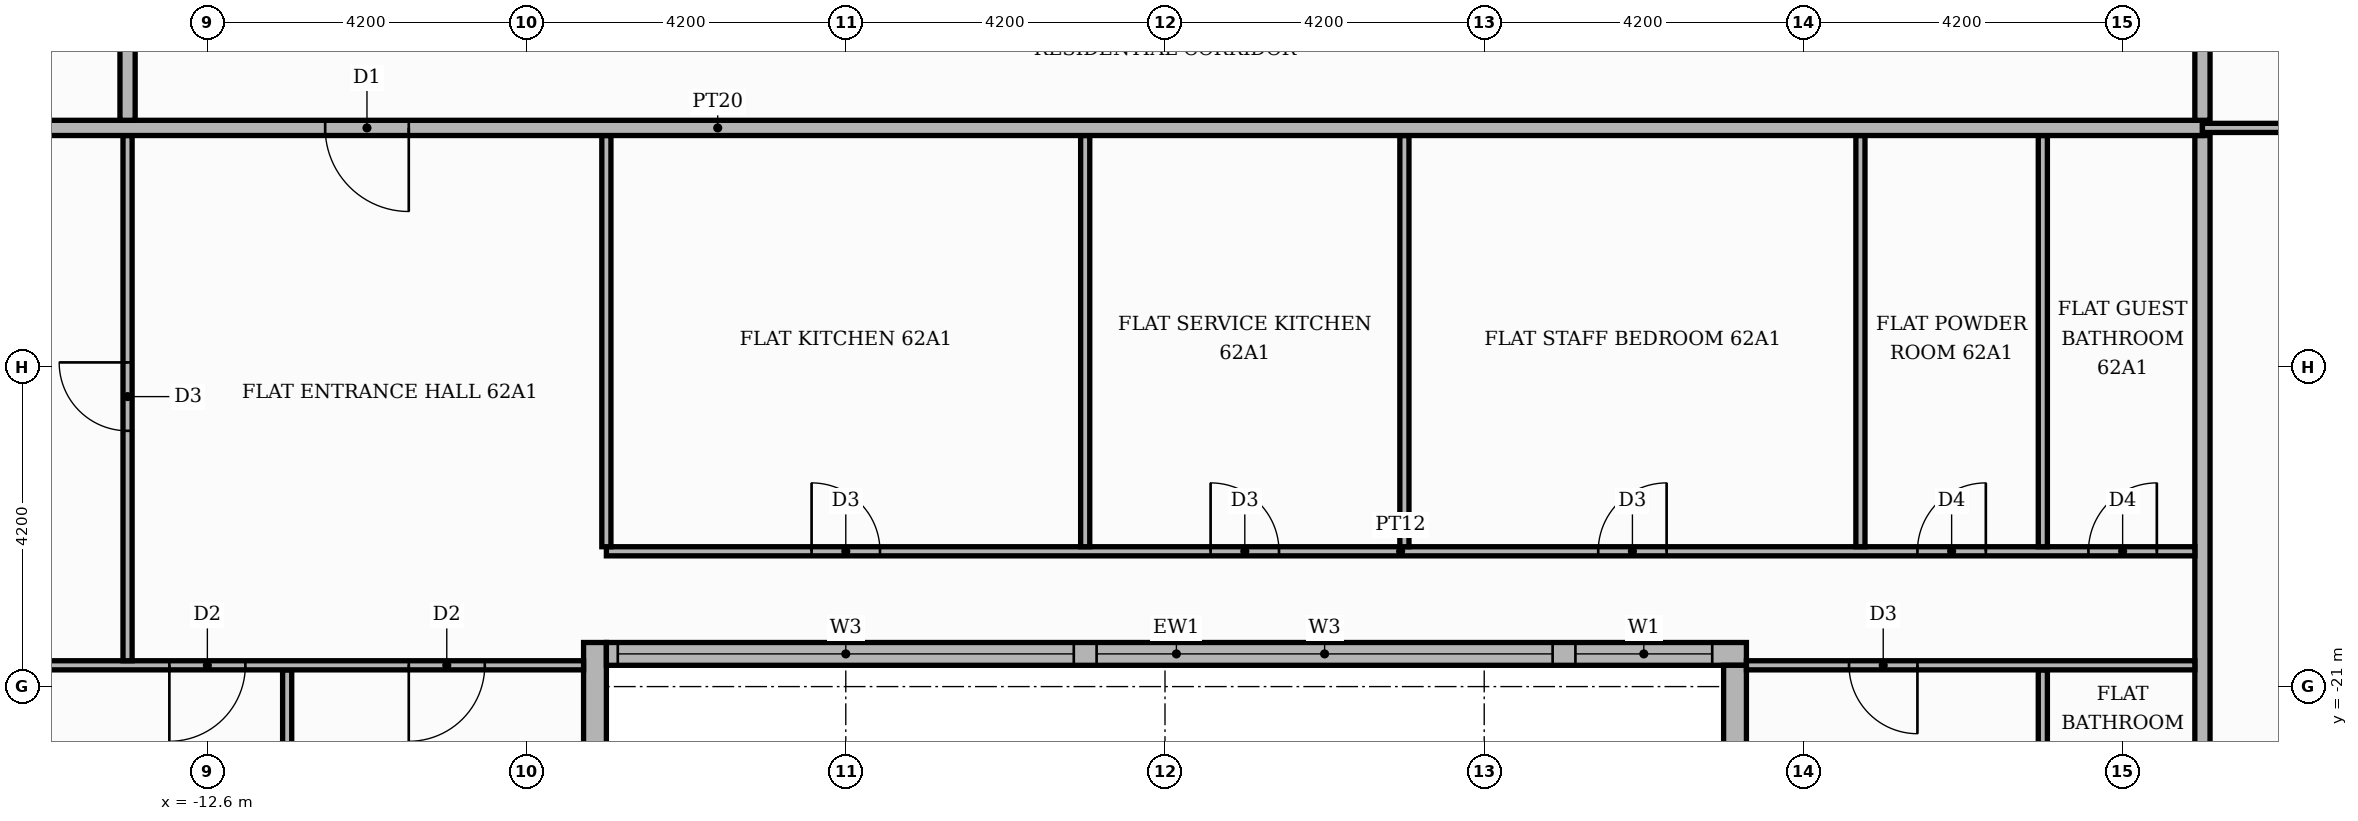
"""IFC4 building model, lengths in metres.
Left out: names, types, materials, properties, quantities, classifications, styles, units other than length and angle.
Written with IfcOpenShell. Run it as: python <this file> out.ifc"""

import sys

from ifc_helpers import new_model, si_unit, direction, frame, frame_2d, origin, place, context, subcontext, project, spatial, rectangle, extrude, element, fill, save


model = new_model("IFC4")
c1 = context("Model", 3, precision=1e-05, world=origin(), true_north=direction((0.0, 1.0)))
c2 = subcontext(c1, "Body", "Model", "MODEL_VIEW")
j1 = project(units=[si_unit("LENGTHUNIT", "METRE"), si_unit("PLANEANGLEUNIT", "RADIAN")], contexts=[c1])
p1 = place(None, origin())
s1 = spatial("IfcSite", under=j1, at=p1, CompositionType="ELEMENT")
p2 = place(p1, origin())
s2 = spatial("IfcBuilding", under=s1, at=p2, CompositionType="ELEMENT")
p3 = place(p2, frame((0.0, 0.0, 260.1)))
s3 = spatial("IfcBuildingStorey", under=s2, at=p3, CompositionType="ELEMENT", Elevation=260.1)
p4 = place(p3, frame((-7.5, -25.42, 0.0), z_axis=(0.0, 0.0, 1.0), x_axis=(0.0, 1.0, 0.0)))
e1 = element("IfcWall", 1, at=p4, inside=s3, PredefinedType="STANDARD", context=c2, shape_type="SweptSolid", body=[
    extrude(rectangle(XDim=5.0, YDim=0.3, at=frame_2d((2.5, 0.0))), origin(), (0.0, 0.0, 1.0), 3.48),
])
p5 = place(p4, frame((1.42, 0.0, 0.9)))
e2 = element("IfcOpeningElement", 2, at=p5, cuts=e1, PredefinedType="OPENING", context=c2, shape_type="SweptSolid", body=[
    extrude(rectangle(XDim=1.8, YDim=2.1, at=frame_2d((0.9, 1.05))), frame((0.0, 0.16, 0.0), z_axis=(0.0, -1.0, 0.0), x_axis=(1.0, 0.0, 0.0)), (0.0, 0.0, 1.0), 0.32),
])
p6 = place(p3, frame((-7.35, -20.57, 0.0), z_axis=(0.0, 0.0, 1.0), x_axis=(1.0, 0.0, 0.0)))
e3 = element("IfcWall", 3, at=p6, inside=s3, PredefinedType="STANDARD", context=c2, shape_type="SweptSolid", body=[
    extrude(rectangle(XDim=15.0, YDim=0.3, at=frame_2d((7.5, 0.0))), origin(), (0.0, 0.0, 1.0), 3.48),
])
p7 = place(p6, frame((0.15, 0.0, 0.9)))
e4 = element("IfcOpeningElement", 4, at=p7, cuts=e3, PredefinedType="OPENING", context=c2, shape_type="SweptSolid", body=[
    extrude(rectangle(XDim=6.0, YDim=2.1, at=frame_2d((3.0, 1.05))), frame((0.0, 0.16, 0.0), z_axis=(0.0, -1.0, 0.0), x_axis=(1.0, 0.0, 0.0)), (0.0, 0.0, 1.0), 0.32),
])
p8 = place(p6, frame((6.45, 0.0, 0.9)))
e5 = element("IfcOpeningElement", 5, at=p8, cuts=e3, PredefinedType="OPENING", context=c2, shape_type="SweptSolid", body=[
    extrude(rectangle(XDim=6.0, YDim=2.1, at=frame_2d((3.0, 1.05))), frame((0.0, 0.16, 0.0), z_axis=(0.0, -1.0, 0.0), x_axis=(1.0, 0.0, 0.0)), (0.0, 0.0, 1.0), 0.32),
])
p9 = place(p6, frame((12.75, 0.0, 0.9)))
e6 = element("IfcOpeningElement", 6, at=p9, cuts=e3, PredefinedType="OPENING", context=c2, shape_type="SweptSolid", body=[
    extrude(rectangle(XDim=1.8, YDim=2.1, at=frame_2d((0.9, 1.05))), frame((0.0, 0.16, 0.0), z_axis=(0.0, -1.0, 0.0), x_axis=(1.0, 0.0, 0.0)), (0.0, 0.0, 1.0), 0.32),
])
p10 = place(p3, frame((7.5, -20.72, 0.0), z_axis=(0.0, 0.0, 1.0), x_axis=(0.0, -1.0, 0.0)))
e7 = element("IfcWall", 7, at=p10, inside=s3, PredefinedType="STANDARD", context=c2, shape_type="SweptSolid", body=[
    extrude(rectangle(XDim=5.0, YDim=0.3, at=frame_2d((2.5, 0.0))), origin(), (0.0, 0.0, 1.0), 3.48),
])
p11 = place(p10, frame((1.48, 0.0, 0.9)))
e8 = element("IfcOpeningElement", 8, at=p11, cuts=e7, PredefinedType="OPENING", context=c2, shape_type="SweptSolid", body=[
    extrude(rectangle(XDim=1.8, YDim=2.1, at=frame_2d((0.9, 1.05))), frame((0.0, 0.16, 0.0), z_axis=(0.0, -1.0, 0.0), x_axis=(1.0, 0.0, 0.0)), (0.0, 0.0, 1.0), 0.32),
])
p12 = place(p3, frame((-11.55, -25.42, 0.0), z_axis=(0.0, 0.0, 1.0), x_axis=(0.0, 1.0, 0.0)))
e9 = element("IfcWall", 9, at=p12, inside=s3, PredefinedType="PARTITIONING", context=c2, shape_type="SweptSolid", body=[
    extrude(rectangle(XDim=4.64, YDim=0.12, at=frame_2d((2.32, 0.0))), origin(), (0.0, 0.0, 1.0), 3.48),
])
p13 = place(p3, frame((11.55, -25.42, 0.0), z_axis=(0.0, 0.0, 1.0), x_axis=(0.0, 1.0, 0.0)))
e10 = element("IfcWall", 10, at=p13, inside=s3, PredefinedType="PARTITIONING", context=c2, shape_type="SweptSolid", body=[
    extrude(rectangle(XDim=4.64, YDim=0.12, at=frame_2d((2.32, 0.0))), origin(), (0.0, 0.0, 1.0), 3.48),
])
p14 = place(p13, frame((1.75, 0.0, 0.0)))
e11 = element("IfcOpeningElement", 11, at=p14, cuts=e10, PredefinedType="OPENING", context=c2, shape_type="SweptSolid", body=[
    extrude(rectangle(XDim=0.9, YDim=2.1, at=frame_2d((0.45, 1.05))), frame((0.0, 0.07, 0.0), z_axis=(0.0, -1.0, 0.0), x_axis=(1.0, 0.0, 0.0)), (0.0, 0.0, 1.0), 0.14),
])
p15 = place(p3, frame((13.65, -25.42, 0.0), z_axis=(0.0, 0.0, 1.0), x_axis=(0.0, 1.0, 0.0)))
e12 = element("IfcWall", 12, at=p15, inside=s3, PredefinedType="PARTITIONING", context=c2, shape_type="SweptSolid", body=[
    extrude(rectangle(XDim=11.67, YDim=0.2, at=frame_2d((5.835, 0.0))), origin(), (0.0, 0.0, 1.0), 3.48),
])
p16 = place(p3, frame((-20.42, -20.72, 0.0), z_axis=(0.0, 0.0, 1.0), x_axis=(1.0, 0.0, 0.0)))
e13 = element("IfcWall", 13, at=p16, inside=s3, PredefinedType="PARTITIONING", context=c2, shape_type="SweptSolid", body=[
    extrude(rectangle(XDim=12.77, YDim=0.12, at=frame_2d((6.385, 0.0))), origin(), (0.0, 0.0, 1.0), 3.48),
])
p17 = place(p16, frame((7.32, 0.0, 0.0)))
e14 = element("IfcOpeningElement", 14, at=p17, cuts=e13, PredefinedType="OPENING", context=c2, shape_type="SweptSolid", body=[
    extrude(rectangle(XDim=1.0, YDim=2.1, at=frame_2d((0.5, 1.05))), frame((0.0, 0.07, 0.0), z_axis=(0.0, -1.0, 0.0), x_axis=(1.0, 0.0, 0.0)), (0.0, 0.0, 1.0), 0.14),
])
p18 = place(p16, frame((10.47, 0.0, 0.0)))
e15 = element("IfcOpeningElement", 15, at=p18, cuts=e13, PredefinedType="OPENING", context=c2, shape_type="SweptSolid", body=[
    extrude(rectangle(XDim=1.0, YDim=2.1, at=frame_2d((0.5, 1.05))), frame((0.0, 0.07, 0.0), z_axis=(0.0, -1.0, 0.0), x_axis=(1.0, 0.0, 0.0)), (0.0, 0.0, 1.0), 0.14),
])
p19 = place(p3, frame((7.65, -20.72, 0.0), z_axis=(0.0, 0.0, 1.0), x_axis=(1.0, 0.0, 0.0)))
e16 = element("IfcWall", 16, at=p19, inside=s3, PredefinedType="PARTITIONING", context=c2, shape_type="SweptSolid", body=[
    extrude(rectangle(XDim=5.9, YDim=0.12, at=frame_2d((2.95, 0.0))), origin(), (0.0, 0.0, 1.0), 3.48),
])
p20 = place(p19, frame((1.35, 0.0, 0.0)))
e17 = element("IfcOpeningElement", 17, at=p20, cuts=e16, PredefinedType="OPENING", context=c2, shape_type="SweptSolid", body=[
    extrude(rectangle(XDim=0.9, YDim=2.1, at=frame_2d((0.45, 1.05))), frame((0.0, 0.07, 0.0), z_axis=(0.0, -1.0, 0.0), x_axis=(1.0, 0.0, 0.0)), (0.0, 0.0, 1.0), 0.14),
])
p21 = place(p3, frame((-13.65, -20.66, 0.0), z_axis=(0.0, 0.0, 1.0), x_axis=(0.0, 1.0, 0.0)))
e18 = element("IfcWall", 18, at=p21, inside=s3, PredefinedType="PARTITIONING", context=c2, shape_type="SweptSolid", body=[
    extrude(rectangle(XDim=6.91, YDim=0.12, at=frame_2d((3.455, 0.0))), origin(), (0.0, 0.0, 1.0), 3.48),
])
p22 = place(p21, frame((3.025, 0.0, 0.0)))
e19 = element("IfcOpeningElement", 19, at=p22, cuts=e18, PredefinedType="OPENING", context=c2, shape_type="SweptSolid", body=[
    extrude(rectangle(XDim=0.9, YDim=2.1, at=frame_2d((0.45, 1.05))), frame((0.0, 0.07, 0.0), z_axis=(0.0, -1.0, 0.0), x_axis=(1.0, 0.0, 0.0)), (0.0, 0.0, 1.0), 0.14),
])
p23 = place(p3, frame((-7.35, -19.22, 0.0), z_axis=(0.0, 0.0, 1.0), x_axis=(1.0, 0.0, 0.0)))
e20 = element("IfcWall", 20, at=p23, inside=s3, PredefinedType="PARTITIONING", context=c2, shape_type="SweptSolid", body=[
    extrude(rectangle(XDim=20.9, YDim=0.12, at=frame_2d((10.45, 0.0))), origin(), (0.0, 0.0, 1.0), 3.48),
])
p24 = place(p23, frame((2.7, 0.0, 0.0)))
e21 = element("IfcOpeningElement", 21, at=p24, cuts=e20, PredefinedType="OPENING", context=c2, shape_type="SweptSolid", body=[
    extrude(rectangle(XDim=0.9, YDim=2.1, at=frame_2d((0.45, 1.05))), frame((0.0, 0.07, 0.0), z_axis=(0.0, -1.0, 0.0), x_axis=(1.0, 0.0, 0.0)), (0.0, 0.0, 1.0), 0.14),
])
p25 = place(p23, frame((7.95, 0.0, 0.0)))
e22 = element("IfcOpeningElement", 22, at=p25, cuts=e20, PredefinedType="OPENING", context=c2, shape_type="SweptSolid", body=[
    extrude(rectangle(XDim=0.9, YDim=2.1, at=frame_2d((0.45, 1.05))), frame((0.0, 0.07, 0.0), z_axis=(0.0, -1.0, 0.0), x_axis=(1.0, 0.0, 0.0)), (0.0, 0.0, 1.0), 0.14),
])
p26 = place(p23, frame((13.05, 0.0, 0.0)))
e23 = element("IfcOpeningElement", 23, at=p26, cuts=e20, PredefinedType="OPENING", context=c2, shape_type="SweptSolid", body=[
    extrude(rectangle(XDim=0.9, YDim=2.1, at=frame_2d((0.45, 1.05))), frame((0.0, 0.07, 0.0), z_axis=(0.0, -1.0, 0.0), x_axis=(1.0, 0.0, 0.0)), (0.0, 0.0, 1.0), 0.14),
])
p27 = place(p23, frame((17.25, 0.0, 0.0)))
e24 = element("IfcOpeningElement", 24, at=p27, cuts=e20, PredefinedType="OPENING", context=c2, shape_type="SweptSolid", body=[
    extrude(rectangle(XDim=0.9, YDim=2.1, at=frame_2d((0.45, 1.05))), frame((0.0, 0.07, 0.0), z_axis=(0.0, -1.0, 0.0), x_axis=(1.0, 0.0, 0.0)), (0.0, 0.0, 1.0), 0.14),
])
p28 = place(p23, frame((19.5, 0.0, 0.0)))
e25 = element("IfcOpeningElement", 25, at=p28, cuts=e20, PredefinedType="OPENING", context=c2, shape_type="SweptSolid", body=[
    extrude(rectangle(XDim=0.9, YDim=2.1, at=frame_2d((0.45, 1.05))), frame((0.0, 0.07, 0.0), z_axis=(0.0, -1.0, 0.0), x_axis=(1.0, 0.0, 0.0)), (0.0, 0.0, 1.0), 0.14),
])
for number, where, z_axis, x_axis in (
    (26, (-7.35, -19.16, 0.0), (0.0, 0.0, 1.0), (0.0, 1.0, 0.0)),
    (27, (-1.05, -19.16, 0.0), (0.0, 0.0, 1.0), (0.0, 1.0, 0.0)),
    (28, (3.15, -19.16, 0.0), (0.0, 0.0, 1.0), (0.0, 1.0, 0.0)),
    (29, (9.15, -19.16, 0.0), (0.0, 0.0, 1.0), (0.0, 1.0, 0.0)),
    (30, (11.55, -19.16, 0.0), (0.0, 0.0, 1.0), (0.0, 1.0, 0.0)),
):
    element("IfcWall", number, at=place(p3, frame(where, z_axis=z_axis, x_axis=x_axis)), inside=s3, PredefinedType="PARTITIONING", context=c2, shape_type="SweptSolid", body=[
        extrude(rectangle(XDim=5.41, YDim=0.12, at=frame_2d((2.705, 0.0))), origin(), (0.0, 0.0, 1.0), 3.48),
    ])
p29 = place(p3, frame((-25.42, -13.65, 0.0), z_axis=(0.0, 0.0, 1.0), x_axis=(1.0, 0.0, 0.0)))
e31 = element("IfcWall", 31, at=p29, inside=s3, PredefinedType="PARTITIONING", context=c2, shape_type="SweptSolid", body=[
    extrude(rectangle(XDim=39.07, YDim=0.2, at=frame_2d((19.535, 0.0))), origin(), (0.0, 0.0, 1.0), 3.48),
])
p30 = place(p29, frame((14.37, 0.0, 0.0)))
e32 = element("IfcOpeningElement", 32, at=p30, cuts=e31, PredefinedType="OPENING", context=c2, shape_type="SweptSolid", body=[
    extrude(rectangle(XDim=1.1, YDim=2.4, at=frame_2d((0.55, 1.2))), frame((0.0, 0.11, 0.0), z_axis=(0.0, -1.0, 0.0), x_axis=(1.0, 0.0, 0.0)), (0.0, 0.0, 1.0), 0.22),
])
p31 = place(p3, frame((13.65, -13.65, 0.0), z_axis=(0.0, 0.0, 1.0), x_axis=(1.0, 0.0, 0.0)))
e33 = element("IfcWall", 33, at=p31, inside=s3, PredefinedType="PARTITIONING", context=c2, shape_type="SweptSolid", body=[
    extrude(rectangle(XDim=6.47, YDim=0.12, at=frame_2d((3.235, 0.0))), origin(), (0.0, 0.0, 1.0), 3.48),
])
p32 = place(p31, frame((2.785, 0.0, 0.0)))
e34 = element("IfcOpeningElement", 34, at=p32, cuts=e33, PredefinedType="OPENING", context=c2, shape_type="SweptSolid", body=[
    extrude(rectangle(XDim=0.9, YDim=2.1, at=frame_2d((0.45, 1.05))), frame((0.0, 0.07, 0.0), z_axis=(0.0, -1.0, 0.0), x_axis=(1.0, 0.0, 0.0)), (0.0, 0.0, 1.0), 0.14),
])
for number, where, z_axis, x_axis in (
    (35, (-13.65, -13.55, 0.0), (0.0, 0.0, 1.0), (0.0, 1.0, 0.0)),
    (36, (13.65, -13.55, 0.0), (0.0, 0.0, 1.0), (0.0, 1.0, 0.0)),
):
    element("IfcWall", number, at=place(p3, frame(where, z_axis=z_axis, x_axis=x_axis)), inside=s3, PredefinedType="PARTITIONING", context=c2, shape_type="SweptSolid", body=[
        extrude(rectangle(XDim=2.45, YDim=0.2, at=frame_2d((1.225, 0.0))), origin(), (0.0, 0.0, 1.0), 3.48),
    ])
p33 = place(p7, origin())
e37 = element("IfcWindow", 37, at=p33, inside=s3, PartitioningType="SINGLE_PANEL", PredefinedType="WINDOW", context=c2, shape_type="SweptSolid", body=[
    extrude(rectangle(XDim=6.0, YDim=2.1, at=frame_2d((3.0, 1.05))), frame((0.0, 0.03, 0.0), z_axis=(0.0, -1.0, 0.0), x_axis=(1.0, 0.0, 0.0)), (0.0, 0.0, 1.0), 0.06),
])
fill(e4, e37)
p34 = place(p8, origin())
e38 = element("IfcWindow", 38, at=p34, inside=s3, PartitioningType="SINGLE_PANEL", PredefinedType="WINDOW", context=c2, shape_type="SweptSolid", body=[
    extrude(rectangle(XDim=6.0, YDim=2.1, at=frame_2d((3.0, 1.05))), frame((0.0, 0.03, 0.0), z_axis=(0.0, -1.0, 0.0), x_axis=(1.0, 0.0, 0.0)), (0.0, 0.0, 1.0), 0.06),
])
fill(e5, e38)
p35 = place(p9, origin())
e39 = element("IfcWindow", 39, at=p35, inside=s3, PartitioningType="SINGLE_PANEL", PredefinedType="WINDOW", context=c2, shape_type="SweptSolid", body=[
    extrude(rectangle(XDim=1.8, YDim=2.1, at=frame_2d((0.9, 1.05))), frame((0.0, 0.03, 0.0), z_axis=(0.0, -1.0, 0.0), x_axis=(1.0, 0.0, 0.0)), (0.0, 0.0, 1.0), 0.06),
])
fill(e6, e39)
p36 = place(p30, frame((1.1, 0.0, 0.0), z_axis=(0.0, 0.0, 1.0), x_axis=(-1.0, 0.0, 0.0)))
e40 = element("IfcDoor", 40, at=p36, inside=s3, OperationType="SINGLE_SWING_RIGHT", PredefinedType="DOOR", context=c2, shape_type="SweptSolid", body=[
    extrude(rectangle(XDim=1.1, YDim=2.4, at=frame_2d((0.55, 1.2))), frame((0.0, 0.025, 0.0), z_axis=(0.0, -1.0, 0.0), x_axis=(1.0, 0.0, 0.0)), (0.0, 0.0, 1.0), 0.05),
])
fill(e32, e40)
p37 = place(p22, origin())
e41 = element("IfcDoor", 41, at=p37, inside=s3, OperationType="SINGLE_SWING_RIGHT", PredefinedType="DOOR", context=c2, shape_type="SweptSolid", body=[
    extrude(rectangle(XDim=0.9, YDim=2.1, at=frame_2d((0.45, 1.05))), frame((0.0, 0.025, 0.0), z_axis=(0.0, -1.0, 0.0), x_axis=(1.0, 0.0, 0.0)), (0.0, 0.0, 1.0), 0.05),
])
fill(e19, e41)
p38 = place(p24, origin())
e42 = element("IfcDoor", 42, at=p38, inside=s3, OperationType="SINGLE_SWING_LEFT", PredefinedType="DOOR", context=c2, shape_type="SweptSolid", body=[
    extrude(rectangle(XDim=0.9, YDim=2.1, at=frame_2d((0.45, 1.05))), frame((0.0, 0.025, 0.0), z_axis=(0.0, -1.0, 0.0), x_axis=(1.0, 0.0, 0.0)), (0.0, 0.0, 1.0), 0.05),
])
fill(e21, e42)
p39 = place(p25, origin())
e43 = element("IfcDoor", 43, at=p39, inside=s3, OperationType="SINGLE_SWING_LEFT", PredefinedType="DOOR", context=c2, shape_type="SweptSolid", body=[
    extrude(rectangle(XDim=0.9, YDim=2.1, at=frame_2d((0.45, 1.05))), frame((0.0, 0.025, 0.0), z_axis=(0.0, -1.0, 0.0), x_axis=(1.0, 0.0, 0.0)), (0.0, 0.0, 1.0), 0.05),
])
fill(e22, e43)
p40 = place(p26, origin())
e44 = element("IfcDoor", 44, at=p40, inside=s3, OperationType="SINGLE_SWING_RIGHT", PredefinedType="DOOR", context=c2, shape_type="SweptSolid", body=[
    extrude(rectangle(XDim=0.9, YDim=2.1, at=frame_2d((0.45, 1.05))), frame((0.0, 0.025, 0.0), z_axis=(0.0, -1.0, 0.0), x_axis=(1.0, 0.0, 0.0)), (0.0, 0.0, 1.0), 0.05),
])
fill(e23, e44)
p41 = place(p27, origin())
e45 = element("IfcDoor", 45, at=p41, inside=s3, OperationType="SINGLE_SWING_RIGHT", PredefinedType="DOOR", context=c2, shape_type="SweptSolid", body=[
    extrude(rectangle(XDim=0.9, YDim=2.1, at=frame_2d((0.45, 1.05))), frame((0.0, 0.025, 0.0), z_axis=(0.0, -1.0, 0.0), x_axis=(1.0, 0.0, 0.0)), (0.0, 0.0, 1.0), 0.05),
])
fill(e24, e45)
p42 = place(p28, origin())
e46 = element("IfcDoor", 46, at=p42, inside=s3, OperationType="SINGLE_SWING_RIGHT", PredefinedType="DOOR", context=c2, shape_type="SweptSolid", body=[
    extrude(rectangle(XDim=0.9, YDim=2.1, at=frame_2d((0.45, 1.05))), frame((0.0, 0.025, 0.0), z_axis=(0.0, -1.0, 0.0), x_axis=(1.0, 0.0, 0.0)), (0.0, 0.0, 1.0), 0.05),
])
fill(e25, e46)
p43 = place(p17, frame((1.0, 0.0, 0.0), z_axis=(0.0, 0.0, 1.0), x_axis=(-1.0, 0.0, 0.0)))
e47 = element("IfcDoor", 47, at=p43, inside=s3, OperationType="SINGLE_SWING_LEFT", PredefinedType="DOOR", context=c2, shape_type="SweptSolid", body=[
    extrude(rectangle(XDim=1.0, YDim=2.1, at=frame_2d((0.5, 1.05))), frame((0.0, 0.025, 0.0), z_axis=(0.0, -1.0, 0.0), x_axis=(1.0, 0.0, 0.0)), (0.0, 0.0, 1.0), 0.05),
])
fill(e14, e47)
p44 = place(p18, frame((1.0, 0.0, 0.0), z_axis=(0.0, 0.0, 1.0), x_axis=(-1.0, 0.0, 0.0)))
e48 = element("IfcDoor", 48, at=p44, inside=s3, OperationType="SINGLE_SWING_LEFT", PredefinedType="DOOR", context=c2, shape_type="SweptSolid", body=[
    extrude(rectangle(XDim=1.0, YDim=2.1, at=frame_2d((0.5, 1.05))), frame((0.0, 0.025, 0.0), z_axis=(0.0, -1.0, 0.0), x_axis=(1.0, 0.0, 0.0)), (0.0, 0.0, 1.0), 0.05),
])
fill(e15, e48)
p45 = place(p20, frame((0.9, 0.0, 0.0), z_axis=(0.0, 0.0, 1.0), x_axis=(-1.0, 0.0, 0.0)))
e49 = element("IfcDoor", 49, at=p45, inside=s3, OperationType="SINGLE_SWING_RIGHT", PredefinedType="DOOR", context=c2, shape_type="SweptSolid", body=[
    extrude(rectangle(XDim=0.9, YDim=2.1, at=frame_2d((0.45, 1.05))), frame((0.0, 0.025, 0.0), z_axis=(0.0, -1.0, 0.0), x_axis=(1.0, 0.0, 0.0)), (0.0, 0.0, 1.0), 0.05),
])
fill(e17, e49)
save(model, sys.argv[1])
